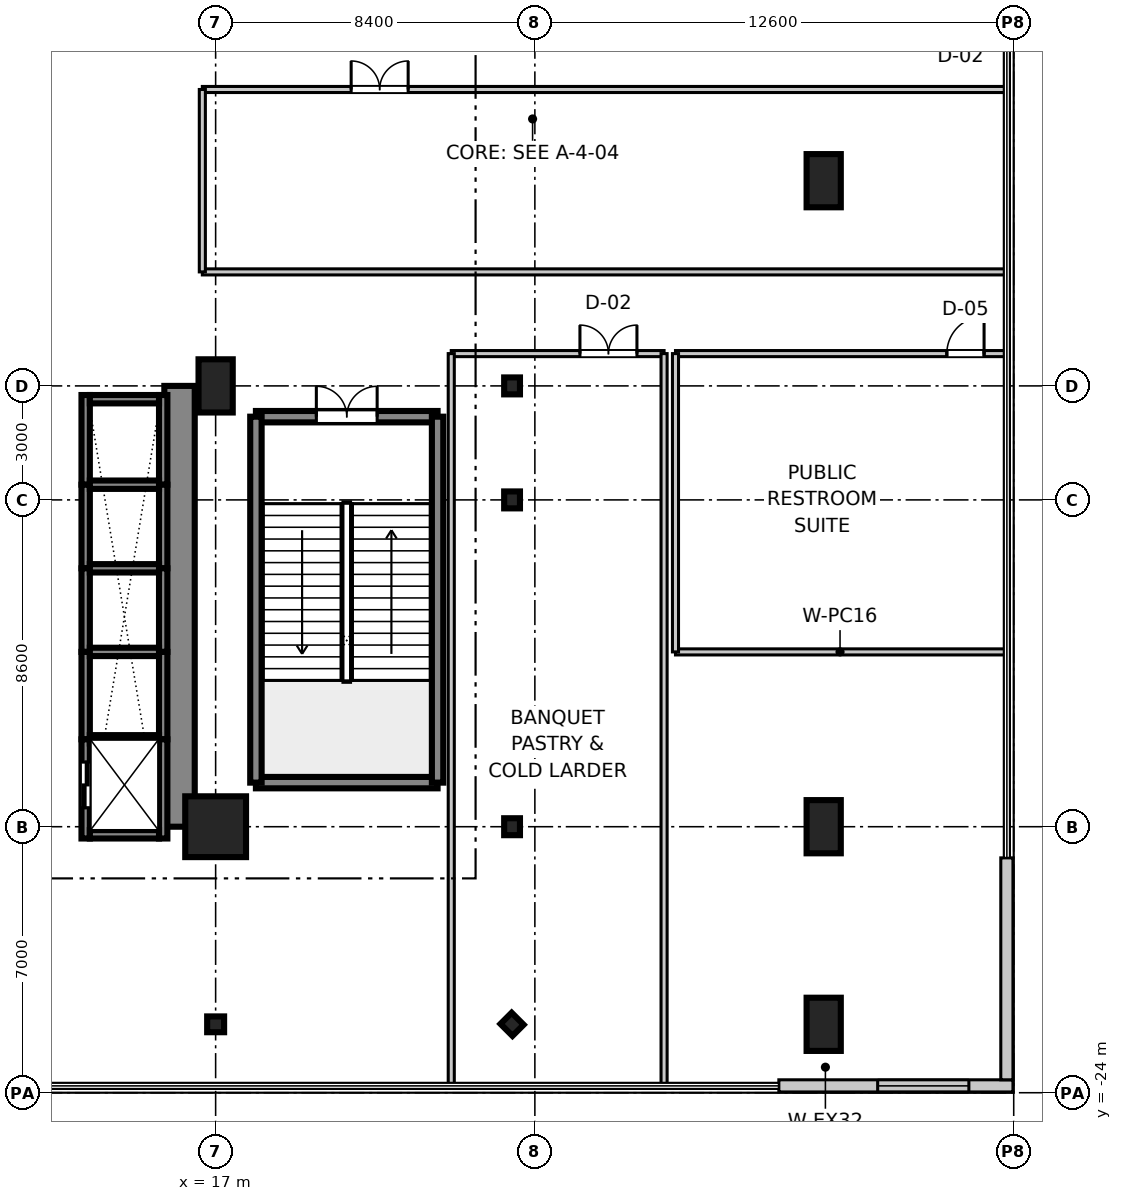
"""IFC4 building model, lengths in metres.
Left out: names, types, materials, properties, quantities, classifications, styles, units other than length and angle.
Written with IfcOpenShell. Run it as: python <this file> out.ifc"""

import sys

from ifc_helpers import new_model, si_unit, direction, frame, frame_2d, origin, origin_2d, place, context, subcontext, project, spatial, rectangle, i_section, extrude, source, transform, mapped, element, fill, save


model = new_model("IFC4")
c1 = context("Model", 3, precision=1e-05, world=origin(), true_north=direction((0.0, 1.0)))
c2 = subcontext(c1, "Body", "Model", "MODEL_VIEW")
j1 = project(units=[si_unit("LENGTHUNIT", "METRE"), si_unit("PLANEANGLEUNIT", "RADIAN")], contexts=[c1])
p1 = place(None, origin())
s1 = spatial("IfcSite", under=j1, at=p1, CompositionType="ELEMENT")
p2 = place(p1, origin())
s2 = spatial("IfcBuilding", under=s1, at=p2, CompositionType="ELEMENT")
p3 = place(p2, frame((0.0, 0.0, 5.4)))
s3 = spatial("IfcBuildingStorey", under=s2, at=p3, CompositionType="ELEMENT", Elevation=5.4)
m1 = source(origin(), c2, "Body", "SweptSolid", [
    extrude(rectangle(XDim=1.6, YDim=1.6, at=origin_2d()), origin(), (0.0, 0.0, 1.0), 5.355),
])
p4 = place(p3, frame((17.0, -17.0, 0.0), z_axis=(0.0, 0.0, 1.0), x_axis=(1.0, 0.0, 0.0)))
e1 = element("IfcColumn", 1, at=p4, inside=s3, PredefinedType="COLUMN", context=c2, shape_type="MappedRepresentation", body=[
    mapped(m1, transform((0.0, 0.0, 0.0), scale=1.0)),
])
m2 = source(origin(), c2, "Body", "SweptSolid", [
    extrude(rectangle(XDim=0.9, YDim=1.4, at=origin_2d()), origin(), (0.0, 0.0, 1.0), 5.355),
])
for number, where, z_axis, x_axis in (
    (2, (17.0, -5.4, 0.0), (0.0, 0.0, 1.0), (1.0, 0.0, 0.0)),
    (3, (33.0, -22.2, 0.0), (0.0, 0.0, 1.0), (1.0, 0.0, 0.0)),
    (4, (33.0, -17.0, 0.0), (0.0, 0.0, 1.0), (1.0, 0.0, 0.0)),
    (5, (33.0, 0.0, 0.0), (0.0, 0.0, 1.0), (1.0, 0.0, 0.0)),
):
    element("IfcColumn", number, at=place(p3, frame(where, z_axis=z_axis, x_axis=x_axis)), inside=s3, PredefinedType="PILASTER", context=c2, shape_type="MappedRepresentation", body=[
        mapped(m2, transform((0.0, 0.0, 0.0), scale=1.0)),
    ])
m3 = source(origin(), c2, "Body", "SweptSolid", [
    extrude(i_section(OverallWidth=0.416, OverallDepth=0.446, WebThickness=0.025, FlangeThickness=0.04, at=origin_2d()), origin(), (0.0, 0.0, 1.0), 5.355),
])
for number, where, z_axis, x_axis in (
    (6, (24.8, -17.0, 0.0), (0.0, 0.0, 1.0), (1.0, 0.0, 0.0)),
    (7, (24.8, -8.4, 0.0), (0.0, 0.0, 1.0), (1.0, 0.0, 0.0)),
    (8, (24.8, -5.4, 0.0), (0.0, 0.0, 1.0), (1.0, 0.0, 0.0)),
    (9, (17.0, -22.2, 0.0), (0.0, 0.0, 1.0), (0.0, 1.0, 0.0)),
    (10, (24.8, -22.2, 0.0), (0.0, 0.0, 1.0), (0.707, 0.707, 0.0)),
):
    element("IfcColumn", number, at=place(p3, frame(where, z_axis=z_axis, x_axis=x_axis)), inside=s3, PredefinedType="COLUMN", context=c2, shape_type="MappedRepresentation", body=[
        mapped(m3, transform((0.0, 0.0, 0.0), scale=1.0)),
    ])
m4 = source(origin(), c2, "Body", "SweptSolid", [
    extrude(rectangle(XDim=11.6, YDim=0.8, at=frame_2d((5.8, 0.0))), origin(), (0.0, 0.0, 1.0), 5.08),
])
p5 = place(p3, frame((16.05, -17.0, 0.0), z_axis=(0.0, 0.0, 1.0), x_axis=(0.0, 1.0, 0.0)))
e11 = element("IfcWall", 11, at=p5, inside=s3, PredefinedType="SHEAR", context=c2, shape_type="MappedRepresentation", body=[
    mapped(m4, transform((0.0, 0.0, 0.0), scale=1.0)),
])
m5 = source(origin(), c2, "Body", "SweptSolid", [
    extrude(rectangle(XDim=4.78, YDim=0.3, at=frame_2d((2.39, 0.0))), origin(), (0.0, 0.0, 1.0), 5.08),
])
p6 = place(p3, frame((18.06, -15.84, 0.0), z_axis=(0.0, 0.0, 1.0), x_axis=(1.0, 0.0, 0.0)))
e12 = element("IfcWall", 12, at=p6, inside=s3, PredefinedType="SHEAR", context=c2, shape_type="MappedRepresentation", body=[
    mapped(m5, transform((0.0, 0.0, 0.0), scale=1.0)),
])
p7 = place(p3, frame((18.06, -6.21, 0.0), z_axis=(0.0, 0.0, 1.0), x_axis=(1.0, 0.0, 0.0)))
e13 = element("IfcWall", 13, at=p7, inside=s3, PredefinedType="SHEAR", context=c2, shape_type="MappedRepresentation", body=[
    mapped(m5, transform((0.0, 0.0, 0.0), scale=1.0)),
])
p8 = place(p7, frame((1.59, 0.0, 0.0)))
e14 = element("IfcOpeningElement", 14, at=p8, cuts=e13, PredefinedType="OPENING", context=c2, shape_type="SweptSolid", body=[
    extrude(rectangle(XDim=1.6, YDim=2.2, at=frame_2d((0.8, 1.1))), frame((0.0, 0.16, 0.0), z_axis=(0.0, -1.0, 0.0), x_axis=(1.0, 0.0, 0.0)), (0.0, 0.0, 1.0), 0.32),
])
m6 = source(origin(), c2, "Body", "SweptSolid", [
    extrude(rectangle(XDim=9.63, YDim=0.3, at=frame_2d((4.815, 0.0))), origin(), (0.0, 0.0, 1.0), 5.08),
])
for number, where, z_axis, x_axis in (
    (15, (18.06, -15.84, 0.0), (0.0, 0.0, 1.0), (0.0, 1.0, 0.0)),
    (16, (22.84, -15.84, 0.0), (0.0, 0.0, 1.0), (0.0, 1.0, 0.0)),
):
    element("IfcWall", number, at=place(p3, frame(where, z_axis=z_axis, x_axis=x_axis)), inside=s3, PredefinedType="SHEAR", context=c2, shape_type="MappedRepresentation", body=[
        mapped(m6, transform((0.0, 0.0, 0.0), scale=1.0)),
    ])
m7 = source(origin(), c2, "Body", "SweptSolid", [
    extrude(rectangle(XDim=2.36, YDim=0.22, at=frame_2d((1.18, 0.0))), origin(), (0.0, 0.0, 1.0), 5.08),
])
for number, where, z_axis, x_axis in (
    (17, (13.58, -8.0, 0.0), (0.0, 0.0, 1.0), (0.0, 1.0, 0.0)),
    (18, (15.62, -8.0, 0.0), (0.0, 0.0, 1.0), (0.0, 1.0, 0.0)),
):
    element("IfcWall", number, at=place(p3, frame(where, z_axis=z_axis, x_axis=x_axis)), inside=s3, PredefinedType="SHEAR", context=c2, shape_type="MappedRepresentation", body=[
        mapped(m7, transform((0.0, 0.0, 0.0), scale=1.0)),
    ])
m8 = source(origin(), c2, "Body", "SweptSolid", [
    extrude(rectangle(XDim=1.82, YDim=0.22, at=frame_2d((0.91, 0.0))), origin(), (0.0, 0.0, 1.0), 5.08),
])
p9 = place(p3, frame((13.69, -5.75, 0.0), z_axis=(0.0, 0.0, 1.0), x_axis=(1.0, 0.0, 0.0)))
e19 = element("IfcWall", 19, at=p9, inside=s3, PredefinedType="SHEAR", context=c2, shape_type="MappedRepresentation", body=[
    mapped(m8, transform((0.0, 0.0, 0.0), scale=1.0)),
])
m9 = source(origin(), c2, "Body", "SweptSolid", [
    extrude(rectangle(XDim=2.2, YDim=0.22, at=frame_2d((1.1, 0.0))), origin(), (0.0, 0.0, 1.0), 5.08),
])
for number, where, z_axis, x_axis in (
    (20, (13.58, -10.2, 0.0), (0.0, 0.0, 1.0), (0.0, 1.0, 0.0)),
    (21, (15.62, -10.2, 0.0), (0.0, 0.0, 1.0), (0.0, 1.0, 0.0)),
):
    element("IfcWall", number, at=place(p3, frame(where, z_axis=z_axis, x_axis=x_axis)), inside=s3, PredefinedType="SHEAR", context=c2, shape_type="MappedRepresentation", body=[
        mapped(m9, transform((0.0, 0.0, 0.0), scale=1.0)),
    ])
m10 = source(origin(), c2, "Body", "SweptSolid", [
    extrude(rectangle(XDim=1.82, YDim=0.22, at=frame_2d((0.91, 0.0))), origin(), (0.0, 0.0, 1.0), 5.4),
])
p10 = place(p3, frame((13.69, -8.0, 0.0), z_axis=(0.0, 0.0, 1.0), x_axis=(1.0, 0.0, 0.0)))
e22 = element("IfcWall", 22, at=p10, inside=s3, PredefinedType="SHEAR", context=c2, shape_type="MappedRepresentation", body=[
    mapped(m10, transform((0.0, 0.0, 0.0), scale=1.0)),
])
for number, where, z_axis, x_axis in (
    (23, (13.58, -12.4, 0.0), (0.0, 0.0, 1.0), (0.0, 1.0, 0.0)),
    (24, (15.62, -12.4, 0.0), (0.0, 0.0, 1.0), (0.0, 1.0, 0.0)),
):
    element("IfcWall", number, at=place(p3, frame(where, z_axis=z_axis, x_axis=x_axis)), inside=s3, PredefinedType="SHEAR", context=c2, shape_type="MappedRepresentation", body=[
        mapped(m9, transform((0.0, 0.0, 0.0), scale=1.0)),
    ])
p11 = place(p3, frame((13.69, -10.2, 0.0), z_axis=(0.0, 0.0, 1.0), x_axis=(1.0, 0.0, 0.0)))
e25 = element("IfcWall", 25, at=p11, inside=s3, PredefinedType="SHEAR", context=c2, shape_type="MappedRepresentation", body=[
    mapped(m10, transform((0.0, 0.0, 0.0), scale=1.0)),
])
m11 = source(origin(), c2, "Body", "SweptSolid", [
    extrude(rectangle(XDim=2.3, YDim=0.22, at=frame_2d((1.15, 0.0))), origin(), (0.0, 0.0, 1.0), 5.08),
])
for number, where, z_axis, x_axis in (
    (26, (13.58, -14.7, 0.0), (0.0, 0.0, 1.0), (0.0, 1.0, 0.0)),
    (27, (15.62, -14.7, 0.0), (0.0, 0.0, 1.0), (0.0, 1.0, 0.0)),
):
    element("IfcWall", number, at=place(p3, frame(where, z_axis=z_axis, x_axis=x_axis)), inside=s3, PredefinedType="SHEAR", context=c2, shape_type="MappedRepresentation", body=[
        mapped(m11, transform((0.0, 0.0, 0.0), scale=1.0)),
    ])
p12 = place(p3, frame((13.69, -12.4, 0.0), z_axis=(0.0, 0.0, 1.0), x_axis=(1.0, 0.0, 0.0)))
e28 = element("IfcWall", 28, at=p12, inside=s3, PredefinedType="SHEAR", context=c2, shape_type="MappedRepresentation", body=[
    mapped(m10, transform((0.0, 0.0, 0.0), scale=1.0)),
])
m12 = source(origin(), c2, "Body", "SweptSolid", [
    extrude(rectangle(XDim=2.61, YDim=0.22, at=frame_2d((1.305, 0.0))), origin(), (0.0, 0.0, 1.0), 5.08),
])
p13 = place(p3, frame((13.58, -17.31, 0.0), z_axis=(0.0, 0.0, 1.0), x_axis=(0.0, 1.0, 0.0)))
e29 = element("IfcWall", 29, at=p13, inside=s3, PredefinedType="SHEAR", context=c2, shape_type="MappedRepresentation", body=[
    mapped(m12, transform((0.0, 0.0, 0.0), scale=1.0)),
])
p14 = place(p13, frame((0.81, 0.0, 0.0)))
e30 = element("IfcOpeningElement", 30, at=p14, cuts=e29, PredefinedType="OPENING", context=c2, shape_type="SweptSolid", body=[
    extrude(rectangle(XDim=1.2, YDim=2.2, at=frame_2d((0.6, 1.1))), frame((0.0, 0.12, 0.0), z_axis=(0.0, -1.0, 0.0), x_axis=(1.0, 0.0, 0.0)), (0.0, 0.0, 1.0), 0.24),
])
p15 = place(p3, frame((15.62, -17.31, 0.0), z_axis=(0.0, 0.0, 1.0), x_axis=(0.0, 1.0, 0.0)))
e31 = element("IfcWall", 31, at=p15, inside=s3, PredefinedType="SHEAR", context=c2, shape_type="MappedRepresentation", body=[
    mapped(m12, transform((0.0, 0.0, 0.0), scale=1.0)),
])
p16 = place(p3, frame((13.69, -17.2, 0.0), z_axis=(0.0, 0.0, 1.0), x_axis=(1.0, 0.0, 0.0)))
e32 = element("IfcWall", 32, at=p16, inside=s3, PredefinedType="SHEAR", context=c2, shape_type="MappedRepresentation", body=[
    mapped(m8, transform((0.0, 0.0, 0.0), scale=1.0)),
])
p17 = place(p3, frame((13.69, -14.7, 0.0), z_axis=(0.0, 0.0, 1.0), x_axis=(1.0, 0.0, 0.0)))
e33 = element("IfcWall", 33, at=p17, inside=s3, PredefinedType="SHEAR", context=c2, shape_type="MappedRepresentation", body=[
    mapped(m10, transform((0.0, 0.0, 0.0), scale=1.0)),
])
m13 = source(origin(), c2, "Body", "SweptSolid", [
    extrude(rectangle(XDim=6.16, YDim=0.32, at=frame_2d((3.08, 0.0))), origin(), (0.0, 0.0, 1.0), 5.08),
])
p18 = place(p3, frame((31.82, -23.82, 0.0), z_axis=(0.0, 0.0, 1.0), x_axis=(1.0, 0.0, 0.0)))
e34 = element("IfcWall", 34, at=p18, inside=s3, PredefinedType="STANDARD", context=c2, shape_type="MappedRepresentation", body=[
    mapped(m13, transform((0.0, 0.0, 0.0), scale=1.0)),
])
p19 = place(p18, frame((2.6, 0.0, 0.9)))
e35 = element("IfcOpeningElement", 35, at=p19, cuts=e34, PredefinedType="OPENING", context=c2, shape_type="SweptSolid", body=[
    extrude(rectangle(XDim=2.4, YDim=2.2, at=frame_2d((1.2, 1.1))), frame((0.0, 0.17, 0.0), z_axis=(0.0, -1.0, 0.0), x_axis=(1.0, 0.0, 0.0)), (0.0, 0.0, 1.0), 0.34),
])
m14 = source(origin(), c2, "Body", "SweptSolid", [
    extrude(rectangle(XDim=5.84, YDim=0.32, at=frame_2d((2.92, 0.0))), origin(), (0.0, 0.0, 1.0), 5.08),
])
p20 = place(p3, frame((37.82, -23.66, 0.0), z_axis=(0.0, 0.0, 1.0), x_axis=(0.0, 1.0, 0.0)))
e36 = element("IfcWall", 36, at=p20, inside=s3, PredefinedType="STANDARD", context=c2, shape_type="MappedRepresentation", body=[
    mapped(m14, transform((0.0, 0.0, 0.0), scale=1.0)),
])
m15 = source(origin(), c2, "Body", "SweptSolid", [
    extrude(rectangle(XDim=5.6, YDim=0.16, at=frame_2d((2.8, 0.0))), origin(), (0.0, 0.0, 1.0), 3.4),
])
p21 = place(p3, frame((23.2, -4.55, 0.0), z_axis=(0.0, 0.0, 1.0), x_axis=(1.0, 0.0, 0.0)))
e37 = element("IfcWall", 37, at=p21, inside=s3, PredefinedType="PARTITIONING", context=c2, shape_type="MappedRepresentation", body=[
    mapped(m15, transform((0.0, 0.0, 0.0), scale=1.0)),
])
p22 = place(p21, frame((3.386, 0.0, 0.0)))
e38 = element("IfcOpeningElement", 38, at=p22, cuts=e37, PredefinedType="OPENING", context=c2, shape_type="SweptSolid", body=[
    extrude(rectangle(XDim=1.5, YDim=2.15, at=frame_2d((0.75, 1.075))), frame((0.0, 0.09, 0.0), z_axis=(0.0, -1.0, 0.0), x_axis=(1.0, 0.0, 0.0)), (0.0, 0.0, 1.0), 0.18),
])
m16 = source(origin(), c2, "Body", "SweptSolid", [
    extrude(rectangle(XDim=19.21, YDim=0.16, at=frame_2d((9.605, 0.0))), origin(), (0.0, 0.0, 1.0), 3.4),
])
for number, where, z_axis, x_axis in (
    (39, (23.2, -23.76, 0.0), (0.0, 0.0, 1.0), (0.0, 1.0, 0.0)),
    (40, (28.8, -23.76, 0.0), (0.0, 0.0, 1.0), (0.0, 1.0, 0.0)),
):
    element("IfcWall", number, at=place(p3, frame(where, z_axis=z_axis, x_axis=x_axis)), inside=s3, PredefinedType="PARTITIONING", context=c2, shape_type="MappedRepresentation", body=[
        mapped(m16, transform((0.0, 0.0, 0.0), scale=1.0)),
    ])
m17 = source(origin(), c2, "Body", "SweptSolid", [
    extrude(rectangle(XDim=21.11, YDim=0.16, at=frame_2d((10.555, 0.0))), origin(), (0.0, 0.0, 1.0), 3.4),
])
p23 = place(p3, frame((16.65, -2.4, 0.0), z_axis=(0.0, 0.0, 1.0), x_axis=(1.0, 0.0, 0.0)))
e41 = element("IfcWall", 41, at=p23, inside=s3, PredefinedType="PARTITIONING", context=c2, shape_type="MappedRepresentation", body=[
    mapped(m17, transform((0.0, 0.0, 0.0), scale=1.0)),
])
p24 = place(p3, frame((16.65, 2.4, 0.0), z_axis=(0.0, 0.0, 1.0), x_axis=(1.0, 0.0, 0.0)))
e42 = element("IfcWall", 42, at=p24, inside=s3, PredefinedType="PARTITIONING", context=c2, shape_type="MappedRepresentation", body=[
    mapped(m17, transform((0.0, 0.0, 0.0), scale=1.0)),
])
p25 = place(p24, frame((3.916, 0.0, 0.0)))
e43 = element("IfcOpeningElement", 43, at=p25, cuts=e42, PredefinedType="OPENING", context=c2, shape_type="SweptSolid", body=[
    extrude(rectangle(XDim=1.5, YDim=2.15, at=frame_2d((0.75, 1.075))), frame((0.0, 0.09, 0.0), z_axis=(0.0, -1.0, 0.0), x_axis=(1.0, 0.0, 0.0)), (0.0, 0.0, 1.0), 0.18),
])
m18 = source(origin(), c2, "Body", "SweptSolid", [
    extrude(rectangle(XDim=4.8, YDim=0.16, at=frame_2d((2.4, 0.0))), origin(), (0.0, 0.0, 1.0), 3.4),
])
p26 = place(p3, frame((16.65, -2.4, 0.0), z_axis=(0.0, 0.0, 1.0), x_axis=(0.0, 1.0, 0.0)))
e44 = element("IfcWall", 44, at=p26, inside=s3, PredefinedType="PARTITIONING", context=c2, shape_type="MappedRepresentation", body=[
    mapped(m18, transform((0.0, 0.0, 0.0), scale=1.0)),
])
m19 = source(origin(), c2, "Body", "SweptSolid", [
    extrude(rectangle(XDim=8.66, YDim=0.16, at=frame_2d((4.33, 0.0))), origin(), (0.0, 0.0, 1.0), 3.4),
])
p27 = place(p3, frame((29.1, -12.4, 0.0), z_axis=(0.0, 0.0, 1.0), x_axis=(1.0, 0.0, 0.0)))
e45 = element("IfcWall", 45, at=p27, inside=s3, PredefinedType="PARTITIONING", context=c2, shape_type="MappedRepresentation", body=[
    mapped(m19, transform((0.0, 0.0, 0.0), scale=1.0)),
])
p28 = place(p3, frame((29.1, -4.55, 0.0), z_axis=(0.0, 0.0, 1.0), x_axis=(1.0, 0.0, 0.0)))
e46 = element("IfcWall", 46, at=p28, inside=s3, PredefinedType="PARTITIONING", context=c2, shape_type="MappedRepresentation", body=[
    mapped(m19, transform((0.0, 0.0, 0.0), scale=1.0)),
])
p29 = place(p28, frame((7.14, 0.0, 0.0)))
e47 = element("IfcOpeningElement", 47, at=p29, cuts=e46, PredefinedType="OPENING", context=c2, shape_type="SweptSolid", body=[
    extrude(rectangle(XDim=0.98, YDim=2.1, at=frame_2d((0.49, 1.05))), frame((0.0, 0.09, 0.0), z_axis=(0.0, -1.0, 0.0), x_axis=(1.0, 0.0, 0.0)), (0.0, 0.0, 1.0), 0.18),
])
m20 = source(origin(), c2, "Body", "SweptSolid", [
    extrude(rectangle(XDim=7.85, YDim=0.16, at=frame_2d((3.925, 0.0))), origin(), (0.0, 0.0, 1.0), 3.4),
])
p30 = place(p3, frame((29.1, -12.4, 0.0), z_axis=(0.0, 0.0, 1.0), x_axis=(0.0, 1.0, 0.0)))
e48 = element("IfcWall", 48, at=p30, inside=s3, PredefinedType="PARTITIONING", context=c2, shape_type="MappedRepresentation", body=[
    mapped(m20, transform((0.0, 0.0, 0.0), scale=1.0)),
])
m21 = source(origin(), c2, "Body", "SweptSolid", [
    extrude(rectangle(XDim=1.6, YDim=2.2, at=frame_2d((0.8, 1.1))), frame((0.0, 0.025, 0.0), z_axis=(0.0, -1.0, 0.0), x_axis=(1.0, 0.0, 0.0)), (0.0, 0.0, 1.0), 0.05),
])
p31 = place(p8, frame((1.6, 0.0, 0.0), z_axis=(0.0, 0.0, 1.0), x_axis=(-1.0, 0.0, 0.0)))
e49 = element("IfcDoor", 49, at=p31, inside=s3, OperationType="DOUBLE_DOOR_SINGLE_SWING", PredefinedType="DOOR", context=c2, shape_type="MappedRepresentation", body=[
    mapped(m21, transform((0.0, 0.0, 0.0), scale=1.0)),
])
fill(e14, e49)
m22 = source(origin(), c2, "Body", "SweptSolid", [
    extrude(rectangle(XDim=1.2, YDim=2.2, at=frame_2d((0.6, 1.1))), frame((0.0, 0.025, 0.0), z_axis=(0.0, -1.0, 0.0), x_axis=(1.0, 0.0, 0.0)), (0.0, 0.0, 1.0), 0.05),
])
p32 = place(p14, origin())
e50 = element("IfcDoor", 50, at=p32, inside=s3, OperationType="DOUBLE_DOOR_SLIDING", PredefinedType="DOOR", context=c2, shape_type="MappedRepresentation", body=[
    mapped(m22, transform((0.0, 0.0, 0.0), scale=1.0)),
])
fill(e30, e50)
m23 = source(origin(), c2, "Body", "SweptSolid", [
    extrude(rectangle(XDim=2.4, YDim=2.2, at=frame_2d((1.2, 1.1))), frame((0.0, 0.03, 0.0), z_axis=(0.0, -1.0, 0.0), x_axis=(1.0, 0.0, 0.0)), (0.0, 0.0, 1.0), 0.06),
])
p33 = place(p19, origin())
e51 = element("IfcWindow", 51, at=p33, inside=s3, PartitioningType="SINGLE_PANEL", PredefinedType="WINDOW", context=c2, shape_type="MappedRepresentation", body=[
    mapped(m23, transform((0.0, 0.0, 0.0), scale=1.0)),
])
fill(e35, e51)
m24 = source(origin(), c2, "Body", "SweptSolid", [
    extrude(rectangle(XDim=1.5, YDim=2.15, at=frame_2d((0.75, 1.075))), frame((0.0, 0.025, 0.0), z_axis=(0.0, -1.0, 0.0), x_axis=(1.0, 0.0, 0.0)), (0.0, 0.0, 1.0), 0.05),
])
p34 = place(p22, frame((1.5, 0.0, 0.0), z_axis=(0.0, 0.0, 1.0), x_axis=(-1.0, 0.0, 0.0)))
e52 = element("IfcDoor", 52, at=p34, inside=s3, OperationType="DOUBLE_DOOR_SINGLE_SWING", PredefinedType="DOOR", context=c2, shape_type="MappedRepresentation", body=[
    mapped(m24, transform((0.0, 0.0, 0.0), scale=1.0)),
])
fill(e38, e52)
p35 = place(p25, frame((1.5, 0.0, 0.0), z_axis=(0.0, 0.0, 1.0), x_axis=(-1.0, 0.0, 0.0)))
e53 = element("IfcDoor", 53, at=p35, inside=s3, OperationType="DOUBLE_DOOR_SINGLE_SWING", PredefinedType="DOOR", context=c2, shape_type="MappedRepresentation", body=[
    mapped(m24, transform((0.0, 0.0, 0.0), scale=1.0)),
])
fill(e43, e53)
m25 = source(origin(), c2, "Body", "SweptSolid", [
    extrude(rectangle(XDim=0.98, YDim=2.1, at=frame_2d((0.49, 1.05))), frame((0.0, 0.025, 0.0), z_axis=(0.0, -1.0, 0.0), x_axis=(1.0, 0.0, 0.0)), (0.0, 0.0, 1.0), 0.05),
])
p36 = place(p29, frame((0.98, 0.0, 0.0), z_axis=(0.0, 0.0, 1.0), x_axis=(-1.0, 0.0, 0.0)))
e54 = element("IfcDoor", 54, at=p36, inside=s3, OperationType="SINGLE_SWING_RIGHT", PredefinedType="DOOR", context=c2, shape_type="MappedRepresentation", body=[
    mapped(m25, transform((0.0, 0.0, 0.0), scale=1.0)),
])
fill(e47, e54)
save(model, sys.argv[1])
